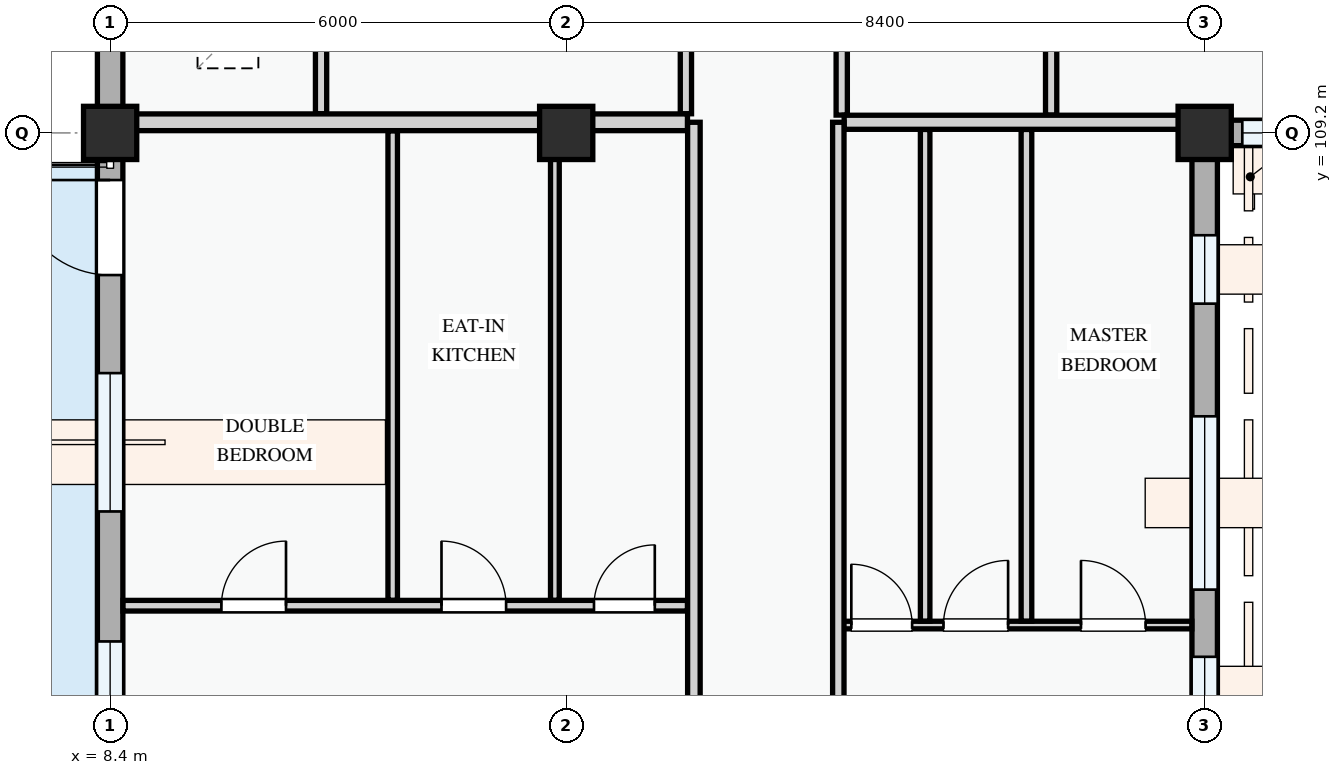
"""IFC4 building model, lengths in metres.
Left out: names, types, materials, properties, quantities, classifications, styles, units other than length and angle.
Written with IfcOpenShell. Run it as: python <this file> out.ifc"""

import sys

from ifc_helpers import new_model, si_unit, direction, frame, frame_2d, origin, origin_2d, place, context, subcontext, project, spatial, rectangle, extrude, element, fill, save


model = new_model("IFC4")
c1 = context("Model", 3, precision=1e-05, world=origin(), true_north=direction((0.0, 1.0)))
c2 = subcontext(c1, "Body", "Model", "MODEL_VIEW")
j1 = project(units=[si_unit("LENGTHUNIT", "METRE"), si_unit("PLANEANGLEUNIT", "RADIAN")], contexts=[c1])
p1 = place(None, origin())
s1 = spatial("IfcSite", under=j1, at=p1, CompositionType="ELEMENT")
p2 = place(p1, origin())
s2 = spatial("IfcBuilding", under=s1, at=p2, CompositionType="ELEMENT")
p3 = place(p2, frame((0.0, 0.0, 18.0)))
s3 = spatial("IfcBuildingStorey", under=s2, at=p3, CompositionType="ELEMENT", Elevation=18.0)
for number, where, z_axis, x_axis in (
    (1, (8.4, 109.2, 0.0), (0.0, 0.0, 1.0), (1.0, 0.0, 0.0)),
    (2, (14.4, 109.2, 0.0), (0.0, 0.0, 1.0), (1.0, 0.0, 0.0)),
    (3, (22.8, 109.2, 0.0), (0.0, 0.0, 1.0), (1.0, 0.0, 0.0)),
):
    element("IfcColumn", number, at=place(p3, frame(where, z_axis=z_axis, x_axis=x_axis)), inside=s3, PredefinedType="COLUMN", context=c2, shape_type="SweptSolid", body=[
        extrude(rectangle(XDim=0.7, YDim=0.7, at=origin_2d()), origin(), (0.0, 0.0, 1.0), 3.3),
    ])
p4 = place(p3, frame((22.8, 109.2, 0.0), z_axis=(0.0, 0.0, 1.0), x_axis=(1.0, 0.0, 0.0)))
e4 = element("IfcWall", 4, at=p4, inside=s3, PredefinedType="STANDARD", context=c2, shape_type="SweptSolid", body=[
    extrude(rectangle(XDim=6.0, YDim=0.335, at=frame_2d((3.0, 0.0))), origin(), (0.0, 0.0, 1.0), 2.475),
])
p5 = place(p4, frame((0.495, 0.0, 0.78)))
e5 = element("IfcOpeningElement", 5, at=p5, cuts=e4, PredefinedType="OPENING", context=c2, shape_type="SweptSolid", body=[
    extrude(rectangle(XDim=1.55, YDim=1.4, at=frame_2d((0.775, 0.7))), frame((0.0, 0.177, 0.0), z_axis=(0.0, -1.0, 0.0), x_axis=(1.0, 0.0, 0.0)), (0.0, 0.0, 1.0), 0.355),
])
p6 = place(p4, frame((2.87, 0.0, 0.78)))
e6 = element("IfcOpeningElement", 6, at=p6, cuts=e4, PredefinedType="OPENING", context=c2, shape_type="SweptSolid", body=[
    extrude(rectangle(XDim=2.42, YDim=1.52, at=frame_2d((1.21, 0.76))), frame((0.0, 0.177, 0.0), z_axis=(0.0, -1.0, 0.0), x_axis=(1.0, 0.0, 0.0)), (0.0, 0.0, 1.0), 0.355),
])
p7 = place(p3, frame((8.4, 115.2, 0.0), z_axis=(0.0, 0.0, 1.0), x_axis=(0.0, -1.0, 0.0)))
e7 = element("IfcWall", 7, at=p7, inside=s3, PredefinedType="STANDARD", context=c2, shape_type="SweptSolid", body=[
    extrude(rectangle(XDim=6.0, YDim=0.335, at=frame_2d((3.0, 0.0))), origin(), (0.0, 0.0, 1.0), 2.575),
])
p8 = place(p7, frame((0.545, 0.0, 0.78)))
e8 = element("IfcOpeningElement", 8, at=p8, cuts=e7, PredefinedType="OPENING", context=c2, shape_type="SweptSolid", body=[
    extrude(rectangle(XDim=0.9, YDim=1.2, at=frame_2d((0.45, 0.6))), frame((0.0, 0.177, 0.0), z_axis=(0.0, -1.0, 0.0), x_axis=(1.0, 0.0, 0.0)), (0.0, 0.0, 1.0), 0.355),
])
p9 = place(p7, frame((2.965, 0.0, 0.78)))
e9 = element("IfcOpeningElement", 9, at=p9, cuts=e7, PredefinedType="OPENING", context=c2, shape_type="SweptSolid", body=[
    extrude(rectangle(XDim=1.68, YDim=1.46, at=frame_2d((0.84, 0.73))), frame((0.0, 0.177, 0.0), z_axis=(0.0, -1.0, 0.0), x_axis=(1.0, 0.0, 0.0)), (0.0, 0.0, 1.0), 0.355),
])
p10 = place(p3, frame((8.4, 109.2, 0.0), z_axis=(0.0, 0.0, 1.0), x_axis=(0.0, -1.0, 0.0)))
e10 = element("IfcWall", 10, at=p10, inside=s3, PredefinedType="STANDARD", context=c2, shape_type="SweptSolid", body=[
    extrude(rectangle(XDim=8.4, YDim=0.335, at=frame_2d((4.2, 0.0))), origin(), (0.0, 0.0, 1.0), 2.425),
])
p11 = place(p10, frame((0.62, 0.0, 0.0)))
e11 = element("IfcOpeningElement", 11, at=p11, cuts=e10, PredefinedType="OPENING", context=c2, shape_type="SweptSolid", body=[
    extrude(rectangle(XDim=1.25, YDim=2.2, at=frame_2d((0.625, 1.1))), frame((0.0, 0.177, 0.0), z_axis=(0.0, -1.0, 0.0), x_axis=(1.0, 0.0, 0.0)), (0.0, 0.0, 1.0), 0.355),
])
p12 = place(p10, frame((3.16, 0.0, 0.78)))
e12 = element("IfcOpeningElement", 12, at=p12, cuts=e10, PredefinedType="OPENING", context=c2, shape_type="SweptSolid", body=[
    extrude(rectangle(XDim=1.82, YDim=1.46, at=frame_2d((0.91, 0.73))), frame((0.0, 0.177, 0.0), z_axis=(0.0, -1.0, 0.0), x_axis=(1.0, 0.0, 0.0)), (0.0, 0.0, 1.0), 0.355),
])
p13 = place(p10, frame((6.69, 0.0, 0.78)))
e13 = element("IfcOpeningElement", 13, at=p13, cuts=e10, PredefinedType="OPENING", context=c2, shape_type="SweptSolid", body=[
    extrude(rectangle(XDim=1.05, YDim=1.2, at=frame_2d((0.525, 0.6))), frame((0.0, 0.177, 0.0), z_axis=(0.0, -1.0, 0.0), x_axis=(1.0, 0.0, 0.0)), (0.0, 0.0, 1.0), 0.355),
])
p14 = place(p3, frame((22.8, 100.8, 0.0), z_axis=(0.0, 0.0, 1.0), x_axis=(0.0, 1.0, 0.0)))
e14 = element("IfcWall", 14, at=p14, inside=s3, PredefinedType="STANDARD", context=c2, shape_type="SweptSolid", body=[
    extrude(rectangle(XDim=8.4, YDim=0.335, at=frame_2d((4.2, 0.0))), origin(), (0.0, 0.0, 1.0), 2.425),
])
p15 = place(p14, frame((0.608, 0.0, 0.78)))
e15 = element("IfcOpeningElement", 15, at=p15, cuts=e14, PredefinedType="OPENING", context=c2, shape_type="SweptSolid", body=[
    extrude(rectangle(XDim=0.9, YDim=1.2, at=frame_2d((0.45, 0.6))), frame((0.0, 0.177, 0.0), z_axis=(0.0, -1.0, 0.0), x_axis=(1.0, 0.0, 0.0)), (0.0, 0.0, 1.0), 0.355),
])
p16 = place(p14, frame((2.392, 0.0, 0.78)))
e16 = element("IfcOpeningElement", 16, at=p16, cuts=e14, PredefinedType="OPENING", context=c2, shape_type="SweptSolid", body=[
    extrude(rectangle(XDim=2.28, YDim=1.46, at=frame_2d((1.14, 0.73))), frame((0.0, 0.177, 0.0), z_axis=(0.0, -1.0, 0.0), x_axis=(1.0, 0.0, 0.0)), (0.0, 0.0, 1.0), 0.355),
])
p17 = place(p14, frame((6.154, 0.0, 0.78)))
e17 = element("IfcOpeningElement", 17, at=p17, cuts=e14, PredefinedType="OPENING", context=c2, shape_type="SweptSolid", body=[
    extrude(rectangle(XDim=0.9, YDim=1.2, at=frame_2d((0.45, 0.6))), frame((0.0, 0.177, 0.0), z_axis=(0.0, -1.0, 0.0), x_axis=(1.0, 0.0, 0.0)), (0.0, 0.0, 1.0), 0.355),
])
for number, where, z_axis, x_axis in (
    (18, (11.175, 113.324, 0.0), (0.0, 0.0, 1.0), (0.0, -1.0, 0.0)),
    (19, (15.975, 113.324, 0.0), (0.0, 0.0, 1.0), (0.0, -1.0, 0.0)),
):
    element("IfcWall", number, at=place(p3, frame(where, z_axis=z_axis, x_axis=x_axis)), inside=s3, PredefinedType="PARTITIONING", context=c2, shape_type="SweptSolid", body=[
        extrude(rectangle(XDim=3.872, YDim=0.148, at=frame_2d((1.936, 0.0))), origin(), (0.0, 0.0, 1.0), 3.0),
    ])
for number, where, z_axis, x_axis in (
    (20, (18.025, 113.324, 0.0), (0.0, 0.0, 1.0), (0.0, -1.0, 0.0)),
    (21, (20.78, 113.324, 0.0), (0.0, 0.0, 1.0), (0.0, -1.0, 0.0)),
):
    element("IfcWall", number, at=place(p3, frame(where, z_axis=z_axis, x_axis=x_axis)), inside=s3, PredefinedType="PARTITIONING", context=c2, shape_type="SweptSolid", body=[
        extrude(rectangle(XDim=3.889, YDim=0.148, at=frame_2d((1.945, 0.0))), origin(), (0.0, 0.0, 1.0), 3.0),
    ])
p18 = place(p3, frame((8.57, 102.98, 0.0), z_axis=(0.0, 0.0, 1.0), x_axis=(1.0, 0.0, 0.0)))
e22 = element("IfcWall", 22, at=p18, inside=s3, PredefinedType="PARTITIONING", context=c2, shape_type="SweptSolid", body=[
    extrude(rectangle(XDim=7.426, YDim=0.14, at=frame_2d((3.713, 0.0))), origin(), (0.0, 0.0, 1.0), 3.0),
])
p19 = place(p18, frame((1.294, 0.0, 0.0)))
e23 = element("IfcOpeningElement", 23, at=p19, cuts=e22, PredefinedType="OPENING", context=c2, shape_type="SweptSolid", body=[
    extrude(rectangle(XDim=0.85, YDim=2.1, at=frame_2d((0.425, 1.05))), frame((0.0, 0.08, 0.0), z_axis=(0.0, -1.0, 0.0), x_axis=(1.0, 0.0, 0.0)), (0.0, 0.0, 1.0), 0.16),
])
p20 = place(p18, frame((4.19, 0.0, 0.0)))
e24 = element("IfcOpeningElement", 24, at=p20, cuts=e22, PredefinedType="OPENING", context=c2, shape_type="SweptSolid", body=[
    extrude(rectangle(XDim=0.85, YDim=2.1, at=frame_2d((0.425, 1.05))), frame((0.0, 0.08, 0.0), z_axis=(0.0, -1.0, 0.0), x_axis=(1.0, 0.0, 0.0)), (0.0, 0.0, 1.0), 0.16),
])
p21 = place(p18, frame((6.196, 0.0, 0.0)))
e25 = element("IfcOpeningElement", 25, at=p21, cuts=e22, PredefinedType="OPENING", context=c2, shape_type="SweptSolid", body=[
    extrude(rectangle(XDim=0.8, YDim=2.1, at=frame_2d((0.4, 1.05))), frame((0.0, 0.08, 0.0), z_axis=(0.0, -1.0, 0.0), x_axis=(1.0, 0.0, 0.0)), (0.0, 0.0, 1.0), 0.16),
])
p22 = place(p3, frame((12.118, 103.052, 0.0), z_axis=(0.0, 0.0, 1.0), x_axis=(0.0, 1.0, 0.0)))
e26 = element("IfcWall", 26, at=p22, inside=s3, PredefinedType="PARTITIONING", context=c2, shape_type="SweptSolid", body=[
    extrude(rectangle(XDim=6.176, YDim=0.125, at=frame_2d((3.088, 0.0))), origin(), (0.0, 0.0, 1.0), 3.0),
])
p23 = place(p3, frame((14.251, 103.052, 0.0), z_axis=(0.0, 0.0, 1.0), x_axis=(0.0, 1.0, 0.0)))
e27 = element("IfcWall", 27, at=p23, inside=s3, PredefinedType="PARTITIONING", context=c2, shape_type="SweptSolid", body=[
    extrude(rectangle(XDim=6.176, YDim=0.115, at=frame_2d((3.088, 0.0))), origin(), (0.0, 0.0, 1.0), 2.425),
])
p24 = place(p3, frame((17.98, 102.726, 0.0), z_axis=(0.0, 0.0, 1.0), x_axis=(1.0, 0.0, 0.0)))
e28 = element("IfcWall", 28, at=p24, inside=s3, PredefinedType="PARTITIONING", context=c2, shape_type="SweptSolid", body=[
    extrude(rectangle(XDim=4.651, YDim=0.1, at=frame_2d((2.325, 0.0))), origin(), (0.0, 0.0, 1.0), 3.0),
])
p25 = place(p24, frame((0.171, 0.0, 0.0)))
e29 = element("IfcOpeningElement", 29, at=p25, cuts=e28, PredefinedType="OPENING", context=c2, shape_type="SweptSolid", body=[
    extrude(rectangle(XDim=0.8, YDim=2.1, at=frame_2d((0.4, 1.05))), frame((0.0, 0.06, 0.0), z_axis=(0.0, -1.0, 0.0), x_axis=(1.0, 0.0, 0.0)), (0.0, 0.0, 1.0), 0.12),
])
p26 = place(p24, frame((1.384, 0.0, 0.0)))
e30 = element("IfcOpeningElement", 30, at=p26, cuts=e28, PredefinedType="OPENING", context=c2, shape_type="SweptSolid", body=[
    extrude(rectangle(XDim=0.85, YDim=2.1, at=frame_2d((0.425, 1.05))), frame((0.0, 0.06, 0.0), z_axis=(0.0, -1.0, 0.0), x_axis=(1.0, 0.0, 0.0)), (0.0, 0.0, 1.0), 0.12),
])
p27 = place(p24, frame((3.193, 0.0, 0.0)))
e31 = element("IfcOpeningElement", 31, at=p27, cuts=e28, PredefinedType="OPENING", context=c2, shape_type="SweptSolid", body=[
    extrude(rectangle(XDim=0.85, YDim=2.1, at=frame_2d((0.425, 1.05))), frame((0.0, 0.06, 0.0), z_axis=(0.0, -1.0, 0.0), x_axis=(1.0, 0.0, 0.0)), (0.0, 0.0, 1.0), 0.12),
])
p28 = place(p3, frame((20.455, 102.778, 0.0), z_axis=(0.0, 0.0, 1.0), x_axis=(0.0, 1.0, 0.0)))
e32 = element("IfcWall", 32, at=p28, inside=s3, PredefinedType="PARTITIONING", context=c2, shape_type="SweptSolid", body=[
    extrude(rectangle(XDim=6.468, YDim=0.14, at=frame_2d((3.234, 0.0))), origin(), (0.0, 0.0, 1.0), 3.0),
])
p29 = place(p3, frame((19.122, 102.778, 0.0), z_axis=(0.0, 0.0, 1.0), x_axis=(0.0, 1.0, 0.0)))
e33 = element("IfcWall", 33, at=p29, inside=s3, PredefinedType="PARTITIONING", context=c2, shape_type="SweptSolid", body=[
    extrude(rectangle(XDim=6.468, YDim=0.125, at=frame_2d((3.234, 0.0))), origin(), (0.0, 0.0, 1.0), 3.0),
])
p30 = place(p3, frame((8.57, 109.34, 0.0), z_axis=(0.0, 0.0, 1.0), x_axis=(1.0, 0.0, 0.0)))
e34 = element("IfcWall", 34, at=p30, inside=s3, PredefinedType="PARTITIONING", context=c2, shape_type="SweptSolid", body=[
    extrude(rectangle(XDim=7.426, YDim=0.22, at=frame_2d((3.713, 0.0))), origin(), (0.0, 0.0, 1.0), 2.375),
])
p31 = place(p3, frame((18.057, 109.34, 0.0), z_axis=(0.0, 0.0, 1.0), x_axis=(1.0, 0.0, 0.0)))
e35 = element("IfcWall", 35, at=p31, inside=s3, PredefinedType="PARTITIONING", context=c2, shape_type="SweptSolid", body=[
    extrude(rectangle(XDim=4.683, YDim=0.185, at=frame_2d((2.342, 0.0))), origin(), (0.0, 0.0, 1.0), 2.375),
])
p32 = place(p3, frame((16.08, 72.06, 0.0), z_axis=(0.0, 0.0, 1.0), x_axis=(0.0, 1.0, 0.0)))
e36 = element("IfcWall", 36, at=p32, inside=s3, PredefinedType="PARTITIONING", context=c2, shape_type="SweptSolid", body=[
    extrude(rectangle(XDim=37.28, YDim=0.165, at=frame_2d((18.64, 0.0))), origin(), (0.0, 0.0, 1.0), 3.0),
])
p33 = place(p32, frame((3.606, 0.0, 0.0)))
e37 = element("IfcOpeningElement", 37, at=p33, cuts=e36, PredefinedType="OPENING", context=c2, shape_type="SweptSolid", body=[
    extrude(rectangle(XDim=0.92, YDim=2.1, at=frame_2d((0.46, 1.05))), frame((0.0, 0.093, 0.0), z_axis=(0.0, -1.0, 0.0), x_axis=(1.0, 0.0, 0.0)), (0.0, 0.0, 1.0), 0.185),
])
p34 = place(p32, frame((16.66, 0.0, 0.0)))
e38 = element("IfcOpeningElement", 38, at=p34, cuts=e36, PredefinedType="OPENING", context=c2, shape_type="SweptSolid", body=[
    extrude(rectangle(XDim=0.96, YDim=2.12, at=frame_2d((0.48, 1.06))), frame((0.0, 0.093, 0.0), z_axis=(0.0, -1.0, 0.0), x_axis=(1.0, 0.0, 0.0)), (0.0, 0.0, 1.0), 0.185),
])
p35 = place(p32, frame((25.269, 0.0, 0.0)))
e39 = element("IfcOpeningElement", 39, at=p35, cuts=e36, PredefinedType="OPENING", context=c2, shape_type="SweptSolid", body=[
    extrude(rectangle(XDim=0.92, YDim=2.1, at=frame_2d((0.46, 1.05))), frame((0.0, 0.093, 0.0), z_axis=(0.0, -1.0, 0.0), x_axis=(1.0, 0.0, 0.0)), (0.0, 0.0, 1.0), 0.185),
])
p36 = place(p3, frame((17.98, 72.06, 0.0), z_axis=(0.0, 0.0, 1.0), x_axis=(0.0, 1.0, 0.0)))
e40 = element("IfcWall", 40, at=p36, inside=s3, PredefinedType="PARTITIONING", context=c2, shape_type="SweptSolid", body=[
    extrude(rectangle(XDim=37.28, YDim=0.15, at=frame_2d((18.64, 0.0))), origin(), (0.0, 0.0, 1.0), 3.0),
])
p37 = place(p36, frame((3.668, 0.0, 0.0)))
e41 = element("IfcOpeningElement", 41, at=p37, cuts=e40, PredefinedType="OPENING", context=c2, shape_type="SweptSolid", body=[
    extrude(rectangle(XDim=0.92, YDim=2.1, at=frame_2d((0.46, 1.05))), frame((0.0, 0.085, 0.0), z_axis=(0.0, -1.0, 0.0), x_axis=(1.0, 0.0, 0.0)), (0.0, 0.0, 1.0), 0.17),
])
p38 = place(p36, frame((16.392, 0.0, 0.0)))
e42 = element("IfcOpeningElement", 42, at=p38, cuts=e40, PredefinedType="OPENING", context=c2, shape_type="SweptSolid", body=[
    extrude(rectangle(XDim=0.92, YDim=2.1, at=frame_2d((0.46, 1.05))), frame((0.0, 0.085, 0.0), z_axis=(0.0, -1.0, 0.0), x_axis=(1.0, 0.0, 0.0)), (0.0, 0.0, 1.0), 0.17),
])
p39 = place(p36, frame((25.246, 0.0, 0.0)))
e43 = element("IfcOpeningElement", 43, at=p39, cuts=e40, PredefinedType="OPENING", context=c2, shape_type="SweptSolid", body=[
    extrude(rectangle(XDim=0.92, YDim=2.1, at=frame_2d((0.46, 1.05))), frame((0.0, 0.085, 0.0), z_axis=(0.0, -1.0, 0.0), x_axis=(1.0, 0.0, 0.0)), (0.0, 0.0, 1.0), 0.17),
])
p40 = place(p5, origin())
e44 = element("IfcWindow", 44, at=p40, inside=s3, PartitioningType="SINGLE_PANEL", PredefinedType="WINDOW", context=c2, shape_type="SweptSolid", body=[
    extrude(rectangle(XDim=1.55, YDim=1.4, at=frame_2d((0.775, 0.7))), frame((0.0, 0.03, 0.0), z_axis=(0.0, -1.0, 0.0), x_axis=(1.0, 0.0, 0.0)), (0.0, 0.0, 1.0), 0.06),
])
fill(e5, e44)
p41 = place(p11, frame((1.25, 0.0, 0.0), z_axis=(0.0, 0.0, 1.0), x_axis=(-1.0, 0.0, 0.0)))
e45 = element("IfcDoor", 45, at=p41, inside=s3, OperationType="SINGLE_SWING_RIGHT", PredefinedType="DOOR", context=c2, shape_type="SweptSolid", body=[
    extrude(rectangle(XDim=1.25, YDim=2.2, at=frame_2d((0.625, 1.1))), frame((0.0, 0.025, 0.0), z_axis=(0.0, -1.0, 0.0), x_axis=(1.0, 0.0, 0.0)), (0.0, 0.0, 1.0), 0.05),
])
fill(e11, e45)
p42 = place(p12, origin())
e46 = element("IfcWindow", 46, at=p42, inside=s3, PartitioningType="DOUBLE_PANEL_VERTICAL", PredefinedType="WINDOW", context=c2, shape_type="SweptSolid", body=[
    extrude(rectangle(XDim=1.82, YDim=1.46, at=frame_2d((0.91, 0.73))), frame((0.0, 0.03, 0.0), z_axis=(0.0, -1.0, 0.0), x_axis=(1.0, 0.0, 0.0)), (0.0, 0.0, 1.0), 0.06),
])
fill(e12, e46)
p43 = place(p13, origin())
e47 = element("IfcWindow", 47, at=p43, inside=s3, PartitioningType="SINGLE_PANEL", PredefinedType="WINDOW", context=c2, shape_type="SweptSolid", body=[
    extrude(rectangle(XDim=1.05, YDim=1.2, at=frame_2d((0.525, 0.6))), frame((0.0, 0.03, 0.0), z_axis=(0.0, -1.0, 0.0), x_axis=(1.0, 0.0, 0.0)), (0.0, 0.0, 1.0), 0.06),
])
fill(e13, e47)
p44 = place(p15, origin())
e48 = element("IfcWindow", 48, at=p44, inside=s3, PartitioningType="SINGLE_PANEL", PredefinedType="WINDOW", context=c2, shape_type="SweptSolid", body=[
    extrude(rectangle(XDim=0.9, YDim=1.2, at=frame_2d((0.45, 0.6))), frame((0.0, 0.03, 0.0), z_axis=(0.0, -1.0, 0.0), x_axis=(1.0, 0.0, 0.0)), (0.0, 0.0, 1.0), 0.06),
])
fill(e15, e48)
p45 = place(p16, origin())
e49 = element("IfcWindow", 49, at=p45, inside=s3, PartitioningType="DOUBLE_PANEL_VERTICAL", PredefinedType="WINDOW", context=c2, shape_type="SweptSolid", body=[
    extrude(rectangle(XDim=2.28, YDim=1.46, at=frame_2d((1.14, 0.73))), frame((0.0, 0.03, 0.0), z_axis=(0.0, -1.0, 0.0), x_axis=(1.0, 0.0, 0.0)), (0.0, 0.0, 1.0), 0.06),
])
fill(e16, e49)
p46 = place(p17, origin())
e50 = element("IfcWindow", 50, at=p46, inside=s3, PartitioningType="SINGLE_PANEL", PredefinedType="WINDOW", context=c2, shape_type="SweptSolid", body=[
    extrude(rectangle(XDim=0.9, YDim=1.2, at=frame_2d((0.45, 0.6))), frame((0.0, 0.03, 0.0), z_axis=(0.0, -1.0, 0.0), x_axis=(1.0, 0.0, 0.0)), (0.0, 0.0, 1.0), 0.06),
])
fill(e17, e50)
p47 = place(p19, origin())
e51 = element("IfcDoor", 51, at=p47, inside=s3, OperationType="SINGLE_SWING_RIGHT", PredefinedType="DOOR", context=c2, shape_type="SweptSolid", body=[
    extrude(rectangle(XDim=0.85, YDim=2.1, at=frame_2d((0.425, 1.05))), frame((0.0, 0.025, 0.0), z_axis=(0.0, -1.0, 0.0), x_axis=(1.0, 0.0, 0.0)), (0.0, 0.0, 1.0), 0.05),
])
fill(e23, e51)
p48 = place(p20, origin())
e52 = element("IfcDoor", 52, at=p48, inside=s3, OperationType="SINGLE_SWING_LEFT", PredefinedType="DOOR", context=c2, shape_type="SweptSolid", body=[
    extrude(rectangle(XDim=0.85, YDim=2.1, at=frame_2d((0.425, 1.05))), frame((0.0, 0.025, 0.0), z_axis=(0.0, -1.0, 0.0), x_axis=(1.0, 0.0, 0.0)), (0.0, 0.0, 1.0), 0.05),
])
fill(e24, e52)
p49 = place(p21, origin())
e53 = element("IfcDoor", 53, at=p49, inside=s3, OperationType="SINGLE_SWING_RIGHT", PredefinedType="DOOR", context=c2, shape_type="SweptSolid", body=[
    extrude(rectangle(XDim=0.8, YDim=2.1, at=frame_2d((0.4, 1.05))), frame((0.0, 0.025, 0.0), z_axis=(0.0, -1.0, 0.0), x_axis=(1.0, 0.0, 0.0)), (0.0, 0.0, 1.0), 0.05),
])
fill(e25, e53)
p50 = place(p25, origin())
e54 = element("IfcDoor", 54, at=p50, inside=s3, OperationType="SINGLE_SWING_LEFT", PredefinedType="DOOR", context=c2, shape_type="SweptSolid", body=[
    extrude(rectangle(XDim=0.8, YDim=2.1, at=frame_2d((0.4, 1.05))), frame((0.0, 0.025, 0.0), z_axis=(0.0, -1.0, 0.0), x_axis=(1.0, 0.0, 0.0)), (0.0, 0.0, 1.0), 0.05),
])
fill(e29, e54)
p51 = place(p26, origin())
e55 = element("IfcDoor", 55, at=p51, inside=s3, OperationType="SINGLE_SWING_RIGHT", PredefinedType="DOOR", context=c2, shape_type="SweptSolid", body=[
    extrude(rectangle(XDim=0.85, YDim=2.1, at=frame_2d((0.425, 1.05))), frame((0.0, 0.025, 0.0), z_axis=(0.0, -1.0, 0.0), x_axis=(1.0, 0.0, 0.0)), (0.0, 0.0, 1.0), 0.05),
])
fill(e30, e55)
p52 = place(p27, origin())
e56 = element("IfcDoor", 56, at=p52, inside=s3, OperationType="SINGLE_SWING_LEFT", PredefinedType="DOOR", context=c2, shape_type="SweptSolid", body=[
    extrude(rectangle(XDim=0.85, YDim=2.1, at=frame_2d((0.425, 1.05))), frame((0.0, 0.025, 0.0), z_axis=(0.0, -1.0, 0.0), x_axis=(1.0, 0.0, 0.0)), (0.0, 0.0, 1.0), 0.05),
])
fill(e31, e56)
save(model, sys.argv[1])
